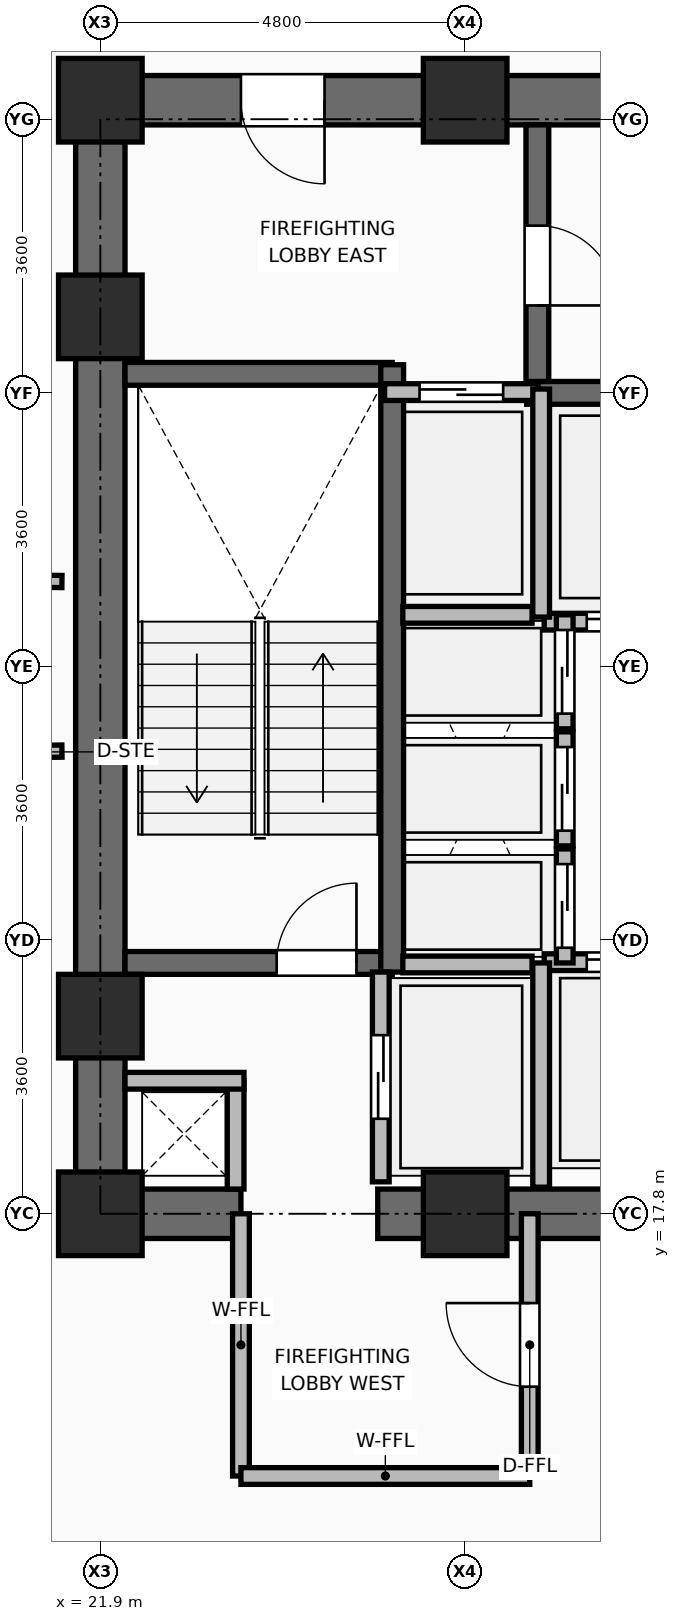
"""IFC4 building model, lengths in metres.
Left out: names, types, materials, properties, quantities, classifications, styles, units other than length and angle.
Written with IfcOpenShell. Run it as: python <this file> out.ifc"""

import sys

from ifc_helpers import new_model, si_unit, direction, frame, frame_2d, origin, origin_2d, place, context, subcontext, project, spatial, rectangle, extrude, element, fill, save


model = new_model("IFC4")
c1 = context("Model", 3, precision=1e-05, world=origin(), true_north=direction((0.0, 1.0)))
c2 = subcontext(c1, "Body", "Model", "MODEL_VIEW")
j1 = project(units=[si_unit("LENGTHUNIT", "METRE"), si_unit("PLANEANGLEUNIT", "RADIAN")], contexts=[c1])
p1 = place(None, origin())
s1 = spatial("IfcSite", under=j1, at=p1, CompositionType="ELEMENT")
p2 = place(p1, origin())
s2 = spatial("IfcBuilding", under=s1, at=p2, CompositionType="ELEMENT")
p3 = place(p2, frame((0.0, 0.0, 64.5)))
s3 = spatial("IfcBuildingStorey", under=s2, at=p3, CompositionType="ELEMENT", Elevation=64.5)
for number, where, z_axis, x_axis in (
    (1, (21.9, 17.8, 0.0), (0.0, 0.0, 1.0), (1.0, 0.0, 0.0)),
    (2, (26.7, 17.8, 0.0), (0.0, 0.0, 1.0), (1.0, 0.0, 0.0)),
    (3, (21.9, 20.4, 0.0), (0.0, 0.0, 1.0), (1.0, 0.0, 0.0)),
    (4, (21.9, 29.6, 0.0), (0.0, 0.0, 1.0), (1.0, 0.0, 0.0)),
    (5, (21.9, 32.45, 0.0), (0.0, 0.0, 1.0), (1.0, 0.0, 0.0)),
    (6, (26.7, 32.45, 0.0), (0.0, 0.0, 1.0), (1.0, 0.0, 0.0)),
):
    element("IfcColumn", number, at=place(p3, frame(where, z_axis=z_axis, x_axis=x_axis)), inside=s3, PredefinedType="COLUMN", context=c2, shape_type="SweptSolid", body=[
        extrude(rectangle(XDim=1.1, YDim=1.1, at=origin_2d()), origin(), (0.0, 0.0, 1.0), 3.75),
    ])
p4 = place(p3, frame((21.575, 17.8, 0.0), z_axis=(0.0, 0.0, 1.0), x_axis=(1.0, 0.0, 0.0)))
e7 = element("IfcWall", 7, at=p4, inside=s3, PredefinedType="SHEAR", context=c2, shape_type="SweptSolid", body=[
    extrude(rectangle(XDim=2.175, YDim=0.65, at=frame_2d((1.087, 0.0))), origin(), (0.0, 0.0, 1.0), 3.57),
])
p5 = place(p3, frame((25.55, 17.8, 0.0), z_axis=(0.0, 0.0, 1.0), x_axis=(1.0, 0.0, 0.0)))
e8 = element("IfcWall", 8, at=p5, inside=s3, PredefinedType="SHEAR", context=c2, shape_type="SweptSolid", body=[
    extrude(rectangle(XDim=6.9, YDim=0.65, at=frame_2d((3.45, 0.0))), origin(), (0.0, 0.0, 1.0), 3.57),
])
p6 = place(p3, frame((21.575, 32.45, 0.0), z_axis=(0.0, 0.0, 1.0), x_axis=(1.0, 0.0, 0.0)))
e9 = element("IfcWall", 9, at=p6, inside=s3, PredefinedType="SHEAR", context=c2, shape_type="SweptSolid", body=[
    extrude(rectangle(XDim=19.85, YDim=0.65, at=frame_2d((9.925, 0.0))), origin(), (0.0, 0.0, 1.0), 3.57),
])
p7 = place(p6, frame((2.175, 0.0, 0.0)))
e10 = element("IfcOpeningElement", 10, at=p7, cuts=e9, PredefinedType="OPENING", context=c2, shape_type="SweptSolid", body=[
    extrude(rectangle(XDim=1.1, YDim=2.1, at=frame_2d((0.55, 1.05))), frame((0.0, 0.335, 0.0), z_axis=(0.0, -1.0, 0.0), x_axis=(1.0, 0.0, 0.0)), (0.0, 0.0, 1.0), 0.67),
])
p8 = place(p6, frame((15.565, 0.0, 0.0)))
e11 = element("IfcOpeningElement", 11, at=p8, cuts=e9, PredefinedType="OPENING", context=c2, shape_type="SweptSolid", body=[
    extrude(rectangle(XDim=1.0, YDim=2.1, at=frame_2d((0.5, 1.05))), frame((0.0, 0.335, 0.0), z_axis=(0.0, -1.0, 0.0), x_axis=(1.0, 0.0, 0.0)), (0.0, 0.0, 1.0), 0.67),
])
p9 = place(p6, frame((17.575, 0.0, 0.0)))
e12 = element("IfcOpeningElement", 12, at=p9, cuts=e9, PredefinedType="OPENING", context=c2, shape_type="SweptSolid", body=[
    extrude(rectangle(XDim=0.9, YDim=2.1, at=frame_2d((0.45, 1.05))), frame((0.0, 0.335, 0.0), z_axis=(0.0, -1.0, 0.0), x_axis=(1.0, 0.0, 0.0)), (0.0, 0.0, 1.0), 0.67),
])
p10 = place(p3, frame((21.9, 18.125, 0.0), z_axis=(0.0, 0.0, 1.0), x_axis=(0.0, 1.0, 0.0)))
e13 = element("IfcWall", 13, at=p10, inside=s3, PredefinedType="SHEAR", context=c2, shape_type="SweptSolid", body=[
    extrude(rectangle(XDim=14.0, YDim=0.65, at=frame_2d((7.0, 0.0))), origin(), (0.0, 0.0, 1.0), 3.57),
])
p11 = place(p3, frame((22.225, 21.1, 0.0), z_axis=(0.0, 0.0, 1.0), x_axis=(1.0, 0.0, 0.0)))
e14 = element("IfcWall", 14, at=p11, inside=s3, PredefinedType="SHEAR", context=c2, shape_type="SweptSolid", body=[
    extrude(rectangle(XDim=3.515, YDim=0.3, at=frame_2d((1.757, 0.0))), origin(), (0.0, 0.0, 1.0), 3.57),
])
p12 = place(p11, frame((1.995, 0.0, 0.0)))
e15 = element("IfcOpeningElement", 15, at=p12, cuts=e14, PredefinedType="OPENING", context=c2, shape_type="SweptSolid", body=[
    extrude(rectangle(XDim=1.05, YDim=2.1, at=frame_2d((0.525, 1.05))), frame((0.0, 0.16, 0.0), z_axis=(0.0, -1.0, 0.0), x_axis=(1.0, 0.0, 0.0)), (0.0, 0.0, 1.0), 0.32),
])
p13 = place(p3, frame((22.225, 28.85, 0.0), z_axis=(0.0, 0.0, 1.0), x_axis=(1.0, 0.0, 0.0)))
e16 = element("IfcWall", 16, at=p13, inside=s3, PredefinedType="SHEAR", context=c2, shape_type="SweptSolid", body=[
    extrude(rectangle(XDim=3.515, YDim=0.3, at=frame_2d((1.757, 0.0))), origin(), (0.0, 0.0, 1.0), 3.57),
])
p14 = place(p3, frame((25.74, 20.98, 0.0), z_axis=(0.0, 0.0, 1.0), x_axis=(0.0, 1.0, 0.0)))
e17 = element("IfcWall", 17, at=p14, inside=s3, PredefinedType="SHEAR", context=c2, shape_type="SweptSolid", body=[
    extrude(rectangle(XDim=7.99, YDim=0.3, at=frame_2d((3.995, 0.0))), origin(), (0.0, 0.0, 1.0), 3.57),
])
p15 = place(p3, frame((27.51, 28.6, 0.0), z_axis=(0.0, 0.0, 1.0), x_axis=(1.0, 0.0, 0.0)))
e18 = element("IfcWall", 18, at=p15, inside=s3, PredefinedType="SHEAR", context=c2, shape_type="SweptSolid", body=[
    extrude(rectangle(XDim=8.03, YDim=0.3, at=frame_2d((4.015, 0.0))), origin(), (0.0, 0.0, 1.0), 3.57),
])
p16 = place(p3, frame((27.65, 28.75, 0.0), z_axis=(0.0, 0.0, 1.0), x_axis=(0.0, 1.0, 0.0)))
e19 = element("IfcWall", 19, at=p16, inside=s3, PredefinedType="SHEAR", context=c2, shape_type="SweptSolid", body=[
    extrude(rectangle(XDim=3.375, YDim=0.3, at=frame_2d((1.688, 0.0))), origin(), (0.0, 0.0, 1.0), 3.57),
])
p17 = place(p16, frame((1.0, 0.0, 0.0)))
e20 = element("IfcOpeningElement", 20, at=p17, cuts=e19, PredefinedType="OPENING", context=c2, shape_type="SweptSolid", body=[
    extrude(rectangle(XDim=1.05, YDim=2.1, at=frame_2d((0.525, 1.05))), frame((0.0, 0.16, 0.0), z_axis=(0.0, -1.0, 0.0), x_axis=(1.0, 0.0, 0.0)), (0.0, 0.0, 1.0), 0.32),
])
p18 = place(p3, frame((23.68, 18.125, 0.0), z_axis=(0.0, 0.0, 1.0), x_axis=(0.0, 1.0, 0.0)))
e21 = element("IfcWall", 21, at=p18, inside=s3, PredefinedType="PARTITIONING", context=c2, shape_type="SweptSolid", body=[
    extrude(rectangle(XDim=1.425, YDim=0.22, at=frame_2d((0.712, 0.0))), origin(), (0.0, 0.0, 1.0), 3.55),
])
p19 = place(p3, frame((22.225, 19.55, 0.0), z_axis=(0.0, 0.0, 1.0), x_axis=(1.0, 0.0, 0.0)))
e22 = element("IfcWall", 22, at=p19, inside=s3, PredefinedType="PARTITIONING", context=c2, shape_type="SweptSolid", body=[
    extrude(rectangle(XDim=1.565, YDim=0.22, at=frame_2d((0.782, 0.0))), origin(), (0.0, 0.0, 1.0), 2.595),
])
p20 = place(p3, frame((25.59, 18.22, 0.0), z_axis=(0.0, 0.0, 1.0), x_axis=(0.0, 1.0, 0.0)))
e23 = element("IfcWall", 23, at=p20, inside=s3, PredefinedType="PARTITIONING", context=c2, shape_type="SweptSolid", body=[
    extrude(rectangle(XDim=2.76, YDim=0.22, at=frame_2d((1.38, 0.0))), origin(), (0.0, 0.0, 1.0), 3.55),
])
p21 = place(p20, frame((0.83, 0.0, 0.0)))
e24 = element("IfcOpeningElement", 24, at=p21, cuts=e23, PredefinedType="OPENING", context=c2, shape_type="SweptSolid", body=[
    extrude(rectangle(XDim=1.1, YDim=2.2, at=frame_2d((0.55, 1.1))), frame((0.0, 0.12, 0.0), z_axis=(0.0, -1.0, 0.0), x_axis=(1.0, 0.0, 0.0)), (0.0, 0.0, 1.0), 0.24),
])
p22 = place(p3, frame((25.64, 28.61, 0.0), z_axis=(0.0, 0.0, 1.0), x_axis=(1.0, 0.0, 0.0)))
e25 = element("IfcWall", 25, at=p22, inside=s3, PredefinedType="PARTITIONING", context=c2, shape_type="SweptSolid", body=[
    extrude(rectangle(XDim=2.02, YDim=0.22, at=frame_2d((1.01, 0.0))), origin(), (0.0, 0.0, 1.0), 3.55),
])
p23 = place(p22, frame((0.46, 0.0, 0.0)))
e26 = element("IfcOpeningElement", 26, at=p23, cuts=e25, PredefinedType="OPENING", context=c2, shape_type="SweptSolid", body=[
    extrude(rectangle(XDim=1.1, YDim=2.2, at=frame_2d((0.55, 1.1))), frame((0.0, 0.12, 0.0), z_axis=(0.0, -1.0, 0.0), x_axis=(1.0, 0.0, 0.0)), (0.0, 0.0, 1.0), 0.24),
])
p24 = place(p3, frame((27.74, 21.11, 0.0), z_axis=(0.0, 0.0, 1.0), x_axis=(1.0, 0.0, 0.0)))
e27 = element("IfcWall", 27, at=p24, inside=s3, PredefinedType="PARTITIONING", context=c2, shape_type="SweptSolid", body=[
    extrude(rectangle(XDim=2.22, YDim=0.22, at=frame_2d((1.11, 0.0))), origin(), (0.0, 0.0, 1.0), 3.55),
])
p25 = place(p24, frame((0.56, 0.0, 0.0)))
e28 = element("IfcOpeningElement", 28, at=p25, cuts=e27, PredefinedType="OPENING", context=c2, shape_type="SweptSolid", body=[
    extrude(rectangle(XDim=1.1, YDim=2.2, at=frame_2d((0.55, 1.1))), frame((0.0, 0.12, 0.0), z_axis=(0.0, -1.0, 0.0), x_axis=(1.0, 0.0, 0.0)), (0.0, 0.0, 1.0), 0.24),
])
p26 = place(p3, frame((27.74, 25.59, 0.0), z_axis=(0.0, 0.0, 1.0), x_axis=(1.0, 0.0, 0.0)))
e29 = element("IfcWall", 29, at=p26, inside=s3, PredefinedType="PARTITIONING", context=c2, shape_type="SweptSolid", body=[
    extrude(rectangle(XDim=2.22, YDim=0.22, at=frame_2d((1.11, 0.0))), origin(), (0.0, 0.0, 1.0), 3.55),
])
p27 = place(p26, frame((0.56, 0.0, 0.0)))
e30 = element("IfcOpeningElement", 30, at=p27, cuts=e29, PredefinedType="OPENING", context=c2, shape_type="SweptSolid", body=[
    extrude(rectangle(XDim=1.1, YDim=2.2, at=frame_2d((0.55, 1.1))), frame((0.0, 0.12, 0.0), z_axis=(0.0, -1.0, 0.0), x_axis=(1.0, 0.0, 0.0)), (0.0, 0.0, 1.0), 0.24),
])
p28 = place(p3, frame((28.01, 21.1, 0.0), z_axis=(0.0, 0.0, 1.0), x_axis=(0.0, 1.0, 0.0)))
e31 = element("IfcWall", 31, at=p28, inside=s3, PredefinedType="PARTITIONING", context=c2, shape_type="SweptSolid", body=[
    extrude(rectangle(XDim=1.5, YDim=0.22, at=frame_2d((0.75, 0.0))), origin(), (0.0, 0.0, 1.0), 3.55),
])
p29 = place(p28, frame((0.2, 0.0, 0.0)))
e32 = element("IfcOpeningElement", 32, at=p29, cuts=e31, PredefinedType="OPENING", context=c2, shape_type="SweptSolid", body=[
    extrude(rectangle(XDim=1.1, YDim=2.2, at=frame_2d((0.55, 1.1))), frame((0.0, 0.12, 0.0), z_axis=(0.0, -1.0, 0.0), x_axis=(1.0, 0.0, 0.0)), (0.0, 0.0, 1.0), 0.24),
])
p30 = place(p3, frame((28.01, 22.64, 0.0), z_axis=(0.0, 0.0, 1.0), x_axis=(0.0, 1.0, 0.0)))
e33 = element("IfcWall", 33, at=p30, inside=s3, PredefinedType="PARTITIONING", context=c2, shape_type="SweptSolid", body=[
    extrude(rectangle(XDim=1.5, YDim=0.22, at=frame_2d((0.75, 0.0))), origin(), (0.0, 0.0, 1.0), 3.55),
])
p31 = place(p30, frame((0.2, 0.0, 0.0)))
e34 = element("IfcOpeningElement", 34, at=p31, cuts=e33, PredefinedType="OPENING", context=c2, shape_type="SweptSolid", body=[
    extrude(rectangle(XDim=1.1, YDim=2.2, at=frame_2d((0.55, 1.1))), frame((0.0, 0.12, 0.0), z_axis=(0.0, -1.0, 0.0), x_axis=(1.0, 0.0, 0.0)), (0.0, 0.0, 1.0), 0.24),
])
p32 = place(p3, frame((28.01, 24.18, 0.0), z_axis=(0.0, 0.0, 1.0), x_axis=(0.0, 1.0, 0.0)))
e35 = element("IfcWall", 35, at=p32, inside=s3, PredefinedType="PARTITIONING", context=c2, shape_type="SweptSolid", body=[
    extrude(rectangle(XDim=1.5, YDim=0.22, at=frame_2d((0.75, 0.0))), origin(), (0.0, 0.0, 1.0), 3.55),
])
p33 = place(p32, frame((0.2, 0.0, 0.0)))
e36 = element("IfcOpeningElement", 36, at=p33, cuts=e35, PredefinedType="OPENING", context=c2, shape_type="SweptSolid", body=[
    extrude(rectangle(XDim=1.1, YDim=2.2, at=frame_2d((0.55, 1.1))), frame((0.0, 0.12, 0.0), z_axis=(0.0, -1.0, 0.0), x_axis=(1.0, 0.0, 0.0)), (0.0, 0.0, 1.0), 0.24),
])
p34 = place(p3, frame((27.7, 18.15, 0.0), z_axis=(0.0, 0.0, 1.0), x_axis=(0.0, 1.0, 0.0)))
e37 = element("IfcWall", 37, at=p34, inside=s3, PredefinedType="PARTITIONING", context=c2, shape_type="SweptSolid", body=[
    extrude(rectangle(XDim=2.95, YDim=0.22, at=frame_2d((1.475, 0.0))), origin(), (0.0, 0.0, 1.0), 3.55),
])
p35 = place(p3, frame((27.7, 25.65, 0.0), z_axis=(0.0, 0.0, 1.0), x_axis=(0.0, 1.0, 0.0)))
e38 = element("IfcWall", 38, at=p35, inside=s3, PredefinedType="PARTITIONING", context=c2, shape_type="SweptSolid", body=[
    extrude(rectangle(XDim=3.0, YDim=0.22, at=frame_2d((1.5, 0.0))), origin(), (0.0, 0.0, 1.0), 3.55),
])
for number, where, z_axis, x_axis in (
    (39, (25.88, 21.08, 0.0), (0.0, 0.0, 1.0), (1.0, 0.0, 0.0)),
    (40, (25.88, 25.68, 0.0), (0.0, 0.0, 1.0), (1.0, 0.0, 0.0)),
):
    element("IfcWall", number, at=place(p3, frame(where, z_axis=z_axis, x_axis=x_axis)), inside=s3, PredefinedType="PARTITIONING", context=c2, shape_type="SweptSolid", body=[
        extrude(rectangle(XDim=1.7, YDim=0.22, at=frame_2d((0.85, 0.0))), origin(), (0.0, 0.0, 1.0), 3.55),
    ])
p36 = place(p3, frame((23.75, 14.35, 0.0), z_axis=(0.0, 0.0, 1.0), x_axis=(0.0, 1.0, 0.0)))
e41 = element("IfcWall", 41, at=p36, inside=s3, PredefinedType="PARTITIONING", context=c2, shape_type="SweptSolid", body=[
    extrude(rectangle(XDim=3.45, YDim=0.22, at=frame_2d((1.725, 0.0))), origin(), (0.0, 0.0, 1.0), 2.928),
])
p37 = place(p3, frame((23.75, 14.35, 0.0), z_axis=(0.0, 0.0, 1.0), x_axis=(1.0, 0.0, 0.0)))
e42 = element("IfcWall", 42, at=p37, inside=s3, PredefinedType="PARTITIONING", context=c2, shape_type="SweptSolid", body=[
    extrude(rectangle(XDim=3.8, YDim=0.22, at=frame_2d((1.9, 0.0))), origin(), (0.0, 0.0, 1.0), 3.55),
])
p38 = place(p3, frame((27.55, 14.35, 0.0), z_axis=(0.0, 0.0, 1.0), x_axis=(0.0, 1.0, 0.0)))
e43 = element("IfcWall", 43, at=p38, inside=s3, PredefinedType="PARTITIONING", context=c2, shape_type="SweptSolid", body=[
    extrude(rectangle(XDim=3.45, YDim=0.22, at=frame_2d((1.725, 0.0))), origin(), (0.0, 0.0, 1.0), 2.928),
])
p39 = place(p38, frame((1.175, 0.0, 0.0)))
e44 = element("IfcOpeningElement", 44, at=p39, cuts=e43, PredefinedType="OPENING", context=c2, shape_type="SweptSolid", body=[
    extrude(rectangle(XDim=1.1, YDim=2.1, at=frame_2d((0.55, 1.05))), frame((0.0, 0.12, 0.0), z_axis=(0.0, -1.0, 0.0), x_axis=(1.0, 0.0, 0.0)), (0.0, 0.0, 1.0), 0.24),
])
p40 = place(p3, frame((21.395, 26.118, 0.0), z_axis=(0.0, 0.0, 1.0), x_axis=(-0.999934344566, 0.011458907294, 0.0)))
e45 = element("IfcWall", 45, at=p40, inside=s3, PredefinedType="PARTITIONING", context=c2, shape_type="SweptSolid", body=[
    extrude(rectangle(XDim=2.109, YDim=0.16, at=frame_2d((1.055, 0.0))), origin(), (0.0, 0.0, 1.0), 3.55),
])
p41 = place(p3, frame((19.286, 23.858, 0.0), z_axis=(0.0, 0.0, 1.0), x_axis=(0.999905141734, 0.013773435799, 0.0)))
e46 = element("IfcWall", 46, at=p41, inside=s3, PredefinedType="PARTITIONING", context=c2, shape_type="SweptSolid", body=[
    extrude(rectangle(XDim=2.109, YDim=0.16, at=frame_2d((1.055, 0.0))), origin(), (0.0, 0.0, 1.0), 3.55),
])
p42 = place(p41, frame((0.749, 0.0, 0.0)))
e47 = element("IfcOpeningElement", 47, at=p42, cuts=e46, PredefinedType="OPENING", context=c2, shape_type="SweptSolid", body=[
    extrude(rectangle(XDim=1.2, YDim=2.1, at=frame_2d((0.6, 1.05))), frame((0.0, 0.09, 0.0), z_axis=(0.0, -1.0, 0.0), x_axis=(1.0, 0.0, 0.0)), (0.0, 0.0, 1.0), 0.18),
])
p43 = place(p12, origin())
e48 = element("IfcDoor", 48, at=p43, inside=s3, OperationType="SINGLE_SWING_RIGHT", PredefinedType="DOOR", context=c2, shape_type="SweptSolid", body=[
    extrude(rectangle(XDim=1.05, YDim=2.1, at=frame_2d((0.525, 1.05))), frame((0.0, 0.025, 0.0), z_axis=(0.0, -1.0, 0.0), x_axis=(1.0, 0.0, 0.0)), (0.0, 0.0, 1.0), 0.05),
])
fill(e15, e48)
p44 = place(p17, frame((1.05, 0.0, 0.0), z_axis=(0.0, 0.0, 1.0), x_axis=(-1.0, 0.0, 0.0)))
e49 = element("IfcDoor", 49, at=p44, inside=s3, OperationType="SINGLE_SWING_RIGHT", PredefinedType="DOOR", context=c2, shape_type="SweptSolid", body=[
    extrude(rectangle(XDim=1.05, YDim=2.1, at=frame_2d((0.525, 1.05))), frame((0.0, 0.025, 0.0), z_axis=(0.0, -1.0, 0.0), x_axis=(1.0, 0.0, 0.0)), (0.0, 0.0, 1.0), 0.05),
])
fill(e20, e49)
p45 = place(p21, origin())
e50 = element("IfcDoor", 50, at=p45, inside=s3, OperationType="DOUBLE_DOOR_SLIDING", PredefinedType="DOOR", context=c2, shape_type="SweptSolid", body=[
    extrude(rectangle(XDim=1.1, YDim=2.2, at=frame_2d((0.55, 1.1))), frame((0.0, 0.025, 0.0), z_axis=(0.0, -1.0, 0.0), x_axis=(1.0, 0.0, 0.0)), (0.0, 0.0, 1.0), 0.05),
])
fill(e24, e50)
p46 = place(p23, origin())
e51 = element("IfcDoor", 51, at=p46, inside=s3, OperationType="DOUBLE_DOOR_SLIDING", PredefinedType="DOOR", context=c2, shape_type="SweptSolid", body=[
    extrude(rectangle(XDim=1.1, YDim=2.2, at=frame_2d((0.55, 1.1))), frame((0.0, 0.025, 0.0), z_axis=(0.0, -1.0, 0.0), x_axis=(1.0, 0.0, 0.0)), (0.0, 0.0, 1.0), 0.05),
])
fill(e26, e51)
p47 = place(p25, origin())
e52 = element("IfcDoor", 52, at=p47, inside=s3, OperationType="DOUBLE_DOOR_SLIDING", PredefinedType="DOOR", context=c2, shape_type="SweptSolid", body=[
    extrude(rectangle(XDim=1.1, YDim=2.2, at=frame_2d((0.55, 1.1))), frame((0.0, 0.025, 0.0), z_axis=(0.0, -1.0, 0.0), x_axis=(1.0, 0.0, 0.0)), (0.0, 0.0, 1.0), 0.05),
])
fill(e28, e52)
p48 = place(p27, frame((1.1, 0.0, 0.0), z_axis=(0.0, 0.0, 1.0), x_axis=(-1.0, 0.0, 0.0)))
e53 = element("IfcDoor", 53, at=p48, inside=s3, OperationType="DOUBLE_DOOR_SLIDING", PredefinedType="DOOR", context=c2, shape_type="SweptSolid", body=[
    extrude(rectangle(XDim=1.1, YDim=2.2, at=frame_2d((0.55, 1.1))), frame((0.0, 0.025, 0.0), z_axis=(0.0, -1.0, 0.0), x_axis=(1.0, 0.0, 0.0)), (0.0, 0.0, 1.0), 0.05),
])
fill(e30, e53)
p49 = place(p29, frame((1.1, 0.0, 0.0), z_axis=(0.0, 0.0, 1.0), x_axis=(-1.0, 0.0, 0.0)))
e54 = element("IfcDoor", 54, at=p49, inside=s3, OperationType="DOUBLE_DOOR_SLIDING", PredefinedType="DOOR", context=c2, shape_type="SweptSolid", body=[
    extrude(rectangle(XDim=1.1, YDim=2.2, at=frame_2d((0.55, 1.1))), frame((0.0, 0.025, 0.0), z_axis=(0.0, -1.0, 0.0), x_axis=(1.0, 0.0, 0.0)), (0.0, 0.0, 1.0), 0.05),
])
fill(e32, e54)
p50 = place(p31, frame((1.1, 0.0, 0.0), z_axis=(0.0, 0.0, 1.0), x_axis=(-1.0, 0.0, 0.0)))
e55 = element("IfcDoor", 55, at=p50, inside=s3, OperationType="DOUBLE_DOOR_SLIDING", PredefinedType="DOOR", context=c2, shape_type="SweptSolid", body=[
    extrude(rectangle(XDim=1.1, YDim=2.2, at=frame_2d((0.55, 1.1))), frame((0.0, 0.025, 0.0), z_axis=(0.0, -1.0, 0.0), x_axis=(1.0, 0.0, 0.0)), (0.0, 0.0, 1.0), 0.05),
])
fill(e34, e55)
p51 = place(p33, frame((1.1, 0.0, 0.0), z_axis=(0.0, 0.0, 1.0), x_axis=(-1.0, 0.0, 0.0)))
e56 = element("IfcDoor", 56, at=p51, inside=s3, OperationType="DOUBLE_DOOR_SLIDING", PredefinedType="DOOR", context=c2, shape_type="SweptSolid", body=[
    extrude(rectangle(XDim=1.1, YDim=2.2, at=frame_2d((0.55, 1.1))), frame((0.0, 0.025, 0.0), z_axis=(0.0, -1.0, 0.0), x_axis=(1.0, 0.0, 0.0)), (0.0, 0.0, 1.0), 0.05),
])
fill(e36, e56)
p52 = place(p39, origin())
e57 = element("IfcDoor", 57, at=p52, inside=s3, OperationType="SINGLE_SWING_RIGHT", PredefinedType="DOOR", context=c2, shape_type="SweptSolid", body=[
    extrude(rectangle(XDim=1.1, YDim=2.1, at=frame_2d((0.55, 1.05))), frame((0.0, 0.025, 0.0), z_axis=(0.0, -1.0, 0.0), x_axis=(1.0, 0.0, 0.0)), (0.0, 0.0, 1.0), 0.05),
])
fill(e44, e57)
p53 = place(p7, frame((1.1, 0.0, 0.0), z_axis=(0.0, 0.0, 1.0), x_axis=(-1.0, 0.0, 0.0)))
e58 = element("IfcDoor", 58, at=p53, inside=s3, OperationType="SINGLE_SWING_LEFT", PredefinedType="DOOR", context=c2, shape_type="SweptSolid", body=[
    extrude(rectangle(XDim=1.1, YDim=2.1, at=frame_2d((0.55, 1.05))), frame((0.0, 0.025, 0.0), z_axis=(0.0, -1.0, 0.0), x_axis=(1.0, 0.0, 0.0)), (0.0, 0.0, 1.0), 0.05),
])
fill(e10, e58)
save(model, sys.argv[1])
